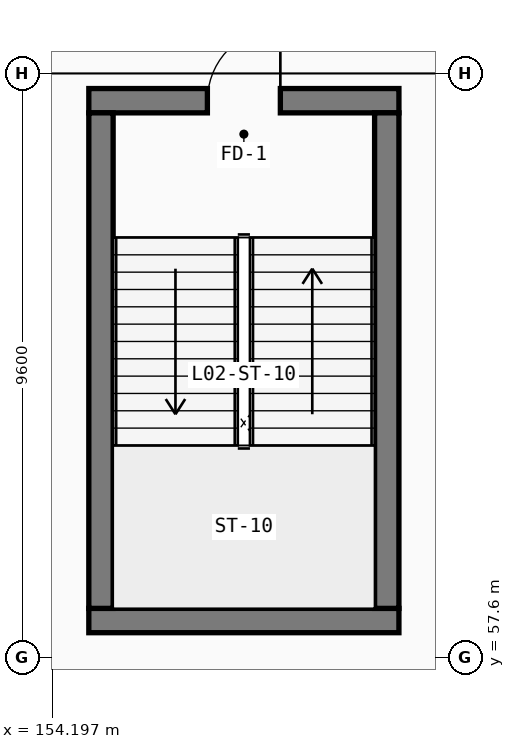
"""IFC4 building model, lengths in metres.
Left out: names, types, materials, properties, quantities, classifications, styles, units other than length and angle.
Written with IfcOpenShell. Run it as: python <this file> out.ifc"""

import sys

from ifc_helpers import new_model, si_unit, direction, frame, frame_2d, origin, place, context, subcontext, project, spatial, rectangle, extrude, element, fill, save


model = new_model("IFC4")
c1 = context("Model", 3, precision=1e-05, world=origin(), true_north=direction((0.0, 1.0)))
c2 = subcontext(c1, "Body", "Model", "MODEL_VIEW")
j1 = project(units=[si_unit("LENGTHUNIT", "METRE"), si_unit("PLANEANGLEUNIT", "RADIAN")], contexts=[c1])
p1 = place(None, origin())
s1 = spatial("IfcSite", under=j1, at=p1, CompositionType="ELEMENT")
p2 = place(p1, origin())
s2 = spatial("IfcBuilding", under=s1, at=p2, CompositionType="ELEMENT")
p3 = place(p2, frame((0.0, 0.0, 9.6)))
s3 = spatial("IfcBuildingStorey", under=s2, at=p3, CompositionType="ELEMENT", Elevation=9.6)
p4 = place(p3, frame((154.8, 58.2, 0.0), z_axis=(0.0, 0.0, 1.0), x_axis=(1.0, 0.0, 0.0)))
e1 = element("IfcWall", 1, at=p4, inside=s3, PredefinedType="SHEAR", context=c2, shape_type="SweptSolid", body=[
    extrude(rectangle(XDim=5.1, YDim=0.4, at=frame_2d((2.55, 0.0))), origin(), (0.0, 0.0, 1.0), 4.22),
])
p5 = place(p3, frame((159.9, 66.75, 0.0), z_axis=(0.0, 0.0, 1.0), x_axis=(-1.0, 0.0, 0.0)))
e2 = element("IfcWall", 2, at=p5, inside=s3, PredefinedType="SHEAR", context=c2, shape_type="SweptSolid", body=[
    extrude(rectangle(XDim=5.1, YDim=0.4, at=frame_2d((2.55, 0.0))), origin(), (0.0, 0.0, 1.0), 4.22),
])
p6 = place(p5, frame((3.15, 0.0, 0.0), z_axis=(0.0, 0.0, 1.0), x_axis=(-1.0, 0.0, 0.0)))
e3 = element("IfcOpeningElement", 3, at=p6, cuts=e2, PredefinedType="OPENING", context=c2, shape_type="SweptSolid", body=[
    extrude(rectangle(XDim=1.2, YDim=2.2, at=frame_2d((0.6, 1.1))), frame((0.0, 0.21, 0.0), z_axis=(0.0, -1.0, 0.0), x_axis=(1.0, 0.0, 0.0)), (0.0, 0.0, 1.0), 0.42),
])
for number, where, z_axis, x_axis in (
    (4, (155.0, 66.55, 0.0), (0.0, 0.0, 1.0), (0.0, -1.0, 0.0)),
    (5, (159.7, 58.4, 0.0), (0.0, 0.0, 1.0), (0.0, 1.0, 0.0)),
):
    element("IfcWall", number, at=place(p3, frame(where, z_axis=z_axis, x_axis=x_axis)), inside=s3, PredefinedType="SHEAR", context=c2, shape_type="SweptSolid", body=[
        extrude(rectangle(XDim=8.15, YDim=0.4, at=frame_2d((4.075, 0.0))), origin(), (0.0, 0.0, 1.0), 4.22),
    ])
p7 = place(p6, origin())
e6 = element("IfcDoor", 6, at=p7, inside=s3, OperationType="SINGLE_SWING_RIGHT", PredefinedType="DOOR", context=c2, shape_type="SweptSolid", body=[
    extrude(rectangle(XDim=1.2, YDim=2.2, at=frame_2d((0.6, 1.1))), frame((0.0, 0.025, 0.0), z_axis=(0.0, -1.0, 0.0), x_axis=(1.0, 0.0, 0.0)), (0.0, 0.0, 1.0), 0.05),
])
fill(e3, e6)
save(model, sys.argv[1])
